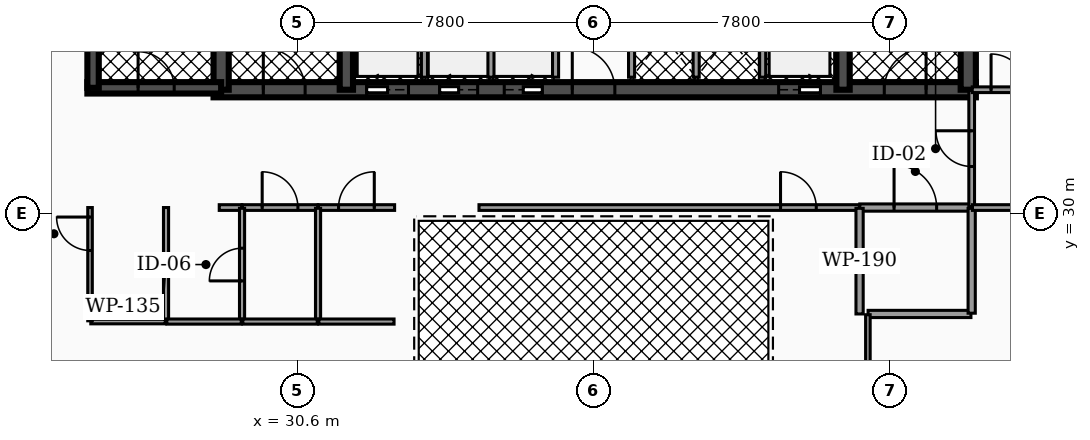
"""IFC4 building model, lengths in metres.
Left out: names, types, materials, properties, quantities, classifications, styles, units other than length and angle.
Written with IfcOpenShell. Run it as: python <this file> out.ifc"""

import sys

from ifc_helpers import new_model, si_unit, direction, frame, frame_2d, origin, place, context, subcontext, project, spatial, rectangle, extrude, element, fill, save


model = new_model("IFC4")
c1 = context("Model", 3, precision=1e-05, world=origin(), true_north=direction((0.0, 1.0)))
c2 = subcontext(c1, "Body", "Model", "MODEL_VIEW")
j1 = project(units=[si_unit("LENGTHUNIT", "METRE"), si_unit("PLANEANGLEUNIT", "RADIAN")], contexts=[c1])
p1 = place(None, origin())
s1 = spatial("IfcSite", under=j1, at=p1, CompositionType="ELEMENT")
p2 = place(p1, origin())
s2 = spatial("IfcBuilding", under=s1, at=p2, CompositionType="ELEMENT")
p3 = place(p2, frame((0.0, 0.0, 153.34)))
s3 = spatial("IfcBuildingStorey", under=s2, at=p3, CompositionType="ELEMENT", Elevation=153.34)
p4 = place(p3, frame((28.4, 33.25, 0.0), z_axis=(0.0, 0.0, 1.0), x_axis=(1.0, 0.0, 0.0)))
e1 = element("IfcWall", 1, at=p4, inside=s3, PredefinedType="SHEAR", context=c2, shape_type="SweptSolid", body=[
    extrude(rectangle(XDim=20.06, YDim=0.4, at=frame_2d((10.03, 0.0))), origin(), (0.0, 0.0, 1.0), 3.5),
])
p5 = place(p4, frame((4.03, 0.0, 0.0)))
e2 = element("IfcOpeningElement", 2, at=p5, cuts=e1, PredefinedType="OPENING", context=c2, shape_type="SweptSolid", body=[
    extrude(rectangle(XDim=1.1, YDim=2.15, at=frame_2d((0.55, 1.075))), frame((0.0, 0.21, 0.0), z_axis=(0.0, -1.0, 0.0), x_axis=(1.0, 0.0, 0.0)), (0.0, 0.0, 1.0), 0.42),
])
p6 = place(p4, frame((14.87, 0.0, 0.0)))
e3 = element("IfcOpeningElement", 3, at=p6, cuts=e1, PredefinedType="OPENING", context=c2, shape_type="SweptSolid", body=[
    extrude(rectangle(XDim=1.1, YDim=2.15, at=frame_2d((0.55, 1.075))), frame((0.0, 0.21, 0.0), z_axis=(0.0, -1.0, 0.0), x_axis=(1.0, 0.0, 0.0)), (0.0, 0.0, 1.0), 0.42),
])
p7 = place(p4, frame((5.95, 0.0, 0.0)))
e4 = element("IfcOpeningElement", 4, at=p7, cuts=e1, PredefinedType="OPENING", context=c2, shape_type="SweptSolid", body=[
    extrude(rectangle(XDim=1.0, YDim=2.1, at=frame_2d((0.5, 1.05))), frame((0.0, 0.21, 0.0), z_axis=(0.0, -1.0, 0.0), x_axis=(1.0, 0.0, 0.0)), (0.0, 0.0, 1.0), 0.42),
])
p8 = place(p4, frame((7.65, 0.0, 0.0)))
e5 = element("IfcOpeningElement", 5, at=p8, cuts=e1, PredefinedType="OPENING", context=c2, shape_type="SweptSolid", body=[
    extrude(rectangle(XDim=1.0, YDim=2.1, at=frame_2d((0.5, 1.05))), frame((0.0, 0.21, 0.0), z_axis=(0.0, -1.0, 0.0), x_axis=(1.0, 0.0, 0.0)), (0.0, 0.0, 1.0), 0.42),
])
p9 = place(p4, frame((1.31, 0.0, 0.0)))
e6 = element("IfcOpeningElement", 6, at=p9, cuts=e1, PredefinedType="OPENING", context=c2, shape_type="SweptSolid", body=[
    extrude(rectangle(XDim=1.1, YDim=2.2, at=frame_2d((0.55, 1.1))), frame((0.0, 0.21, 0.0), z_axis=(0.0, -1.0, 0.0), x_axis=(1.0, 0.0, 0.0)), (0.0, 0.0, 1.0), 0.42),
])
p10 = place(p4, frame((9.44, 0.0, 0.0)))
e7 = element("IfcOpeningElement", 7, at=p10, cuts=e1, PredefinedType="OPENING", context=c2, shape_type="SweptSolid", body=[
    extrude(rectangle(XDim=1.12, YDim=2.05, at=frame_2d((0.56, 1.025))), frame((0.0, 0.21, 0.0), z_axis=(0.0, -1.0, 0.0), x_axis=(1.0, 0.0, 0.0)), (0.0, 0.0, 1.0), 0.42),
])
p11 = place(p4, frame((17.65, 0.0, 0.0)))
e8 = element("IfcOpeningElement", 8, at=p11, cuts=e1, PredefinedType="OPENING", context=c2, shape_type="SweptSolid", body=[
    extrude(rectangle(XDim=1.1, YDim=2.2, at=frame_2d((0.55, 1.1))), frame((0.0, 0.21, 0.0), z_axis=(0.0, -1.0, 0.0), x_axis=(1.0, 0.0, 0.0)), (0.0, 0.0, 1.0), 0.42),
])
p12 = place(p3, frame((28.6, 33.25, 0.0), z_axis=(0.0, 0.0, 1.0), x_axis=(0.0, 1.0, 0.0)))
e9 = element("IfcWall", 9, at=p12, inside=s3, PredefinedType="SHEAR", context=c2, shape_type="SweptSolid", body=[
    extrude(rectangle(XDim=10.2, YDim=0.4, at=frame_2d((5.1, 0.0))), origin(), (0.0, 0.0, 1.0), 3.5),
])
for number, where, z_axis, x_axis in (
    (10, (31.895, 33.25, 0.0), (0.0, 0.0, 1.0), (0.0, 1.0, 0.0)),
    (11, (44.965, 33.25, 0.0), (0.0, 0.0, 1.0), (0.0, 1.0, 0.0)),
):
    element("IfcWall", number, at=place(p3, frame(where, z_axis=z_axis, x_axis=x_axis)), inside=s3, PredefinedType="SHEAR", context=c2, shape_type="SweptSolid", body=[
        extrude(rectangle(XDim=10.2, YDim=0.35, at=frame_2d((5.1, 0.0))), origin(), (0.0, 0.0, 1.0), 3.5),
    ])
p13 = place(p3, frame((48.26, 33.25, 0.0), z_axis=(0.0, 0.0, 1.0), x_axis=(0.0, 1.0, 0.0)))
e12 = element("IfcWall", 12, at=p13, inside=s3, PredefinedType="SHEAR", context=c2, shape_type="SweptSolid", body=[
    extrude(rectangle(XDim=10.2, YDim=0.4, at=frame_2d((5.1, 0.0))), origin(), (0.0, 0.0, 1.0), 3.5),
])
p14 = place(p3, frame((25.08, 33.3, 0.0), z_axis=(0.0, 0.0, 1.0), x_axis=(1.0, 0.0, 0.0)))
e13 = element("IfcWall", 13, at=p14, inside=s3, PredefinedType="SHEAR", context=c2, shape_type="SweptSolid", body=[
    extrude(rectangle(XDim=3.52, YDim=0.3, at=frame_2d((1.76, 0.0))), origin(), (0.0, 0.0, 1.0), 3.5),
])
p15 = place(p14, frame((1.335, 0.0, 0.0)))
e14 = element("IfcOpeningElement", 14, at=p15, cuts=e13, PredefinedType="OPENING", context=c2, shape_type="SweptSolid", body=[
    extrude(rectangle(XDim=0.95, YDim=2.2, at=frame_2d((0.475, 1.1))), frame((0.0, 0.16, 0.0), z_axis=(0.0, -1.0, 0.0), x_axis=(1.0, 0.0, 0.0)), (0.0, 0.0, 1.0), 0.32),
])
p16 = place(p3, frame((25.23, 33.3, 0.0), z_axis=(0.0, 0.0, 1.0), x_axis=(0.0, 1.0, 0.0)))
e15 = element("IfcWall", 15, at=p16, inside=s3, PredefinedType="SHEAR", context=c2, shape_type="SweptSolid", body=[
    extrude(rectangle(XDim=7.6, YDim=0.3, at=frame_2d((3.8, 0.0))), origin(), (0.0, 0.0, 1.0), 3.5),
])
for number, where, z_axis, x_axis in (
    (16, (33.95, 33.58, 0.0), (0.0, 0.0, 1.0), (0.0, 1.0, 0.0)),
    (17, (42.85, 33.58, 0.0), (0.0, 0.0, 1.0), (0.0, 1.0, 0.0)),
):
    element("IfcWall", number, at=place(p3, frame(where, z_axis=z_axis, x_axis=x_axis)), inside=s3, PredefinedType="SOLIDWALL", context=c2, shape_type="SweptSolid", body=[
        extrude(rectangle(XDim=2.45, YDim=0.16, at=frame_2d((1.225, 0.0))), origin(), (0.0, 0.0, 1.0), 2.472),
    ])
for number, where, z_axis, x_axis in (
    (18, (35.7, 33.58, 0.0), (0.0, 0.0, 1.0), (0.0, 1.0, 0.0)),
    (19, (37.4, 33.58, 0.0), (0.0, 0.0, 1.0), (0.0, 1.0, 0.0)),
    (20, (39.4, 33.58, 0.0), (0.0, 0.0, 1.0), (0.0, 1.0, 0.0)),
    (21, (41.1, 33.58, 0.0), (0.0, 0.0, 1.0), (0.0, 1.0, 0.0)),
):
    element("IfcWall", number, at=place(p3, frame(where, z_axis=z_axis, x_axis=x_axis)), inside=s3, PredefinedType="SOLIDWALL", context=c2, shape_type="SweptSolid", body=[
        extrude(rectangle(XDim=2.25, YDim=0.16, at=frame_2d((1.125, 0.0))), origin(), (0.0, 0.0, 1.0), 2.472),
    ])
p17 = place(p3, frame((45.405, 30.15, 0.0), z_axis=(0.0, 0.0, 1.0), x_axis=(1.0, 0.0, 0.0)))
e22 = element("IfcWall", 22, at=p17, inside=s3, PredefinedType="PARTITIONING", context=c2, shape_type="SweptSolid", body=[
    extrude(rectangle(XDim=2.925, YDim=0.19, at=frame_2d((1.462, 0.0))), origin(), (0.0, 0.0, 1.0), 2.447),
])
p18 = place(p17, frame((0.903, 0.0, 0.0)))
e23 = element("IfcOpeningElement", 23, at=p18, cuts=e22, PredefinedType="OPENING", context=c2, shape_type="SweptSolid", body=[
    extrude(rectangle(XDim=1.12, YDim=2.05, at=frame_2d((0.56, 1.025))), frame((0.0, 0.105, 0.0), z_axis=(0.0, -1.0, 0.0), x_axis=(1.0, 0.0, 0.0)), (0.0, 0.0, 1.0), 0.21),
])
p19 = place(p3, frame((48.35, 30.17, 0.0), z_axis=(0.0, 0.0, 1.0), x_axis=(0.0, 1.0, 0.0)))
e24 = element("IfcWall", 24, at=p19, inside=s3, PredefinedType="PARTITIONING", context=c2, shape_type="SweptSolid", body=[
    extrude(rectangle(XDim=3.06, YDim=0.15, at=frame_2d((1.53, 0.0))), origin(), (0.0, 0.0, 1.0), 2.447),
])
p20 = place(p19, frame((1.06, 0.0, 0.0)))
e25 = element("IfcOpeningElement", 25, at=p20, cuts=e24, PredefinedType="OPENING", context=c2, shape_type="SweptSolid", body=[
    extrude(rectangle(XDim=0.94, YDim=2.05, at=frame_2d((0.47, 1.025))), frame((0.0, 0.085, 0.0), z_axis=(0.0, -1.0, 0.0), x_axis=(1.0, 0.0, 0.0)), (0.0, 0.0, 1.0), 0.17),
])
p21 = place(p3, frame((28.55, 30.15, 0.0), z_axis=(0.0, 0.0, 1.0), x_axis=(1.0, 0.0, 0.0)))
e26 = element("IfcWall", 26, at=p21, inside=s3, PredefinedType="PARTITIONING", context=c2, shape_type="SweptSolid", body=[
    extrude(rectangle(XDim=0.595, YDim=0.15, at=frame_2d((0.297, 0.0))), origin(), (0.0, 0.0, 1.0), 2.447),
])
p22 = place(p3, frame((29.155, 30.15, 0.0), z_axis=(0.0, 0.0, 1.0), x_axis=(1.0, 0.0, 0.0)))
e27 = element("IfcWall", 27, at=p22, inside=s3, PredefinedType="PARTITIONING", context=c2, shape_type="SweptSolid", body=[
    extrude(rectangle(XDim=1.99, YDim=0.15, at=frame_2d((0.995, 0.0))), origin(), (0.0, 0.0, 1.0), 2.447),
])
p23 = place(p22, frame((0.525, 0.0, 0.0)))
e28 = element("IfcOpeningElement", 28, at=p23, cuts=e27, PredefinedType="OPENING", context=c2, shape_type="SweptSolid", body=[
    extrude(rectangle(XDim=0.94, YDim=2.05, at=frame_2d((0.47, 1.025))), frame((0.0, 0.085, 0.0), z_axis=(0.0, -1.0, 0.0), x_axis=(1.0, 0.0, 0.0)), (0.0, 0.0, 1.0), 0.17),
])
p24 = place(p3, frame((31.155, 30.15, 0.0), z_axis=(0.0, 0.0, 1.0), x_axis=(1.0, 0.0, 0.0)))
e29 = element("IfcWall", 29, at=p24, inside=s3, PredefinedType="PARTITIONING", context=c2, shape_type="SweptSolid", body=[
    extrude(rectangle(XDim=2.01, YDim=0.15, at=frame_2d((1.005, 0.0))), origin(), (0.0, 0.0, 1.0), 2.447),
])
p25 = place(p24, frame((0.535, 0.0, 0.0)))
e30 = element("IfcOpeningElement", 30, at=p25, cuts=e29, PredefinedType="OPENING", context=c2, shape_type="SweptSolid", body=[
    extrude(rectangle(XDim=0.94, YDim=2.05, at=frame_2d((0.47, 1.025))), frame((0.0, 0.085, 0.0), z_axis=(0.0, -1.0, 0.0), x_axis=(1.0, 0.0, 0.0)), (0.0, 0.0, 1.0), 0.17),
])
p26 = place(p3, frame((35.385, 30.15, 0.0), z_axis=(0.0, 0.0, 1.0), x_axis=(1.0, 0.0, 0.0)))
e31 = element("IfcWall", 31, at=p26, inside=s3, PredefinedType="PARTITIONING", context=c2, shape_type="SweptSolid", body=[
    extrude(rectangle(XDim=10.01, YDim=0.15, at=frame_2d((5.005, 0.0))), origin(), (0.0, 0.0, 1.0), 2.447),
])
p27 = place(p26, frame((7.935, 0.0, 0.0)))
e32 = element("IfcOpeningElement", 32, at=p27, cuts=e31, PredefinedType="OPENING", context=c2, shape_type="SweptSolid", body=[
    extrude(rectangle(XDim=0.94, YDim=2.05, at=frame_2d((0.47, 1.025))), frame((0.0, 0.085, 0.0), z_axis=(0.0, -1.0, 0.0), x_axis=(1.0, 0.0, 0.0)), (0.0, 0.0, 1.0), 0.17),
])
p28 = place(p3, frame((45.4, 27.35, 0.0), z_axis=(0.0, 0.0, 1.0), x_axis=(0.0, 1.0, 0.0)))
e33 = element("IfcWall", 33, at=p28, inside=s3, PredefinedType="PARTITIONING", context=c2, shape_type="SweptSolid", body=[
    extrude(rectangle(XDim=2.78, YDim=0.19, at=frame_2d((1.39, 0.0))), origin(), (0.0, 0.0, 1.0), 2.447),
])
p29 = place(p3, frame((45.624, 27.35, 0.0), z_axis=(0.0, 0.0, 1.0), x_axis=(1.0, 0.0, 0.0)))
e34 = element("IfcWall", 34, at=p29, inside=s3, PredefinedType="PARTITIONING", context=c2, shape_type="SweptSolid", body=[
    extrude(rectangle(XDim=2.706, YDim=0.19, at=frame_2d((1.353, 0.0))), origin(), (0.0, 0.0, 1.0), 2.447),
])
p30 = place(p3, frame((48.35, 27.37, 0.0), z_axis=(0.0, 0.0, 1.0), x_axis=(0.0, 1.0, 0.0)))
e35 = element("IfcWall", 35, at=p30, inside=s3, PredefinedType="PARTITIONING", context=c2, shape_type="SweptSolid", body=[
    extrude(rectangle(XDim=2.76, YDim=0.19, at=frame_2d((1.38, 0.0))), origin(), (0.0, 0.0, 1.0), 2.447),
])
p31 = place(p3, frame((48.37, 30.15, 0.0), z_axis=(0.0, 0.0, 1.0), x_axis=(1.0, 0.0, 0.0)))
e36 = element("IfcWall", 36, at=p31, inside=s3, PredefinedType="PARTITIONING", context=c2, shape_type="SweptSolid", body=[
    extrude(rectangle(XDim=3.26, YDim=0.15, at=frame_2d((1.63, 0.0))), origin(), (0.0, 0.0, 1.0), 2.447),
])
p32 = place(p31, frame((1.16, 0.0, 0.0)))
e37 = element("IfcOpeningElement", 37, at=p32, cuts=e36, PredefinedType="OPENING", context=c2, shape_type="SweptSolid", body=[
    extrude(rectangle(XDim=0.94, YDim=2.05, at=frame_2d((0.47, 1.025))), frame((0.0, 0.085, 0.0), z_axis=(0.0, -1.0, 0.0), x_axis=(1.0, 0.0, 0.0)), (0.0, 0.0, 1.0), 0.17),
])
p33 = place(p3, frame((48.365, 33.25, 0.0), z_axis=(0.0, 0.0, 1.0), x_axis=(1.0, 0.0, 0.0)))
e38 = element("IfcWall", 38, at=p33, inside=s3, PredefinedType="PARTITIONING", context=c2, shape_type="SweptSolid", body=[
    extrude(rectangle(XDim=1.93, YDim=0.15, at=frame_2d((0.965, 0.0))), origin(), (0.0, 0.0, 1.0), 2.447),
])
p34 = place(p33, frame((0.495, 0.0, 0.0)))
e39 = element("IfcOpeningElement", 39, at=p34, cuts=e38, PredefinedType="OPENING", context=c2, shape_type="SweptSolid", body=[
    extrude(rectangle(XDim=0.94, YDim=2.05, at=frame_2d((0.47, 1.025))), frame((0.0, 0.085, 0.0), z_axis=(0.0, -1.0, 0.0), x_axis=(1.0, 0.0, 0.0)), (0.0, 0.0, 1.0), 0.17),
])
p35 = place(p3, frame((27.15, 27.17, 0.0), z_axis=(0.0, 0.0, 1.0), x_axis=(0.0, 1.0, 0.0)))
e40 = element("IfcWall", 40, at=p35, inside=s3, PredefinedType="PARTITIONING", context=c2, shape_type="SweptSolid", body=[
    extrude(rectangle(XDim=2.98, YDim=0.135, at=frame_2d((1.49, 0.0))), origin(), (0.0, 0.0, 1.0), 2.447),
])
p36 = place(p3, frame((25.17, 27.15, 0.0), z_axis=(0.0, 0.0, 1.0), x_axis=(1.0, 0.0, 0.0)))
e41 = element("IfcWall", 41, at=p36, inside=s3, PredefinedType="PARTITIONING", context=c2, shape_type="SweptSolid", body=[
    extrude(rectangle(XDim=1.96, YDim=0.12, at=frame_2d((0.98, 0.0))), origin(), (0.0, 0.0, 1.0), 2.447),
])
p37 = place(p3, frame((25.15, 27.17, 0.0), z_axis=(0.0, 0.0, 1.0), x_axis=(0.0, 1.0, 0.0)))
e42 = element("IfcWall", 42, at=p37, inside=s3, PredefinedType="PARTITIONING", context=c2, shape_type="SweptSolid", body=[
    extrude(rectangle(XDim=2.98, YDim=0.12, at=frame_2d((1.49, 0.0))), origin(), (0.0, 0.0, 1.0), 2.447),
])
p38 = place(p37, frame((1.85, 0.0, 0.0)))
e43 = element("IfcOpeningElement", 43, at=p38, cuts=e42, PredefinedType="OPENING", context=c2, shape_type="SweptSolid", body=[
    extrude(rectangle(XDim=0.88, YDim=2.05, at=frame_2d((0.44, 1.025))), frame((0.0, 0.07, 0.0), z_axis=(0.0, -1.0, 0.0), x_axis=(1.0, 0.0, 0.0)), (0.0, 0.0, 1.0), 0.14),
])
p39 = place(p3, frame((29.15, 27.17, 0.0), z_axis=(0.0, 0.0, 1.0), x_axis=(0.0, 1.0, 0.0)))
e44 = element("IfcWall", 44, at=p39, inside=s3, PredefinedType="PARTITIONING", context=c2, shape_type="SweptSolid", body=[
    extrude(rectangle(XDim=2.96, YDim=0.135, at=frame_2d((1.48, 0.0))), origin(), (0.0, 0.0, 1.0), 2.447),
])
p40 = place(p39, frame((1.05, 0.0, 0.0)))
e45 = element("IfcOpeningElement", 45, at=p40, cuts=e44, PredefinedType="OPENING", context=c2, shape_type="SweptSolid", body=[
    extrude(rectangle(XDim=0.86, YDim=2.05, at=frame_2d((0.43, 1.025))), frame((0.0, 0.077, 0.0), z_axis=(0.0, -1.0, 0.0), x_axis=(1.0, 0.0, 0.0)), (0.0, 0.0, 1.0), 0.155),
])
p41 = place(p3, frame((27.17, 27.15, 0.0), z_axis=(0.0, 0.0, 1.0), x_axis=(1.0, 0.0, 0.0)))
e46 = element("IfcWall", 46, at=p41, inside=s3, PredefinedType="PARTITIONING", context=c2, shape_type="SweptSolid", body=[
    extrude(rectangle(XDim=1.96, YDim=0.135, at=frame_2d((0.98, 0.0))), origin(), (0.0, 0.0, 1.0), 2.447),
])
p42 = place(p3, frame((31.15, 27.17, 0.0), z_axis=(0.0, 0.0, 1.0), x_axis=(0.0, 1.0, 0.0)))
e47 = element("IfcWall", 47, at=p42, inside=s3, PredefinedType="PARTITIONING", context=c2, shape_type="SweptSolid", body=[
    extrude(rectangle(XDim=2.96, YDim=0.135, at=frame_2d((1.48, 0.0))), origin(), (0.0, 0.0, 1.0), 2.447),
])
p43 = place(p3, frame((29.17, 27.15, 0.0), z_axis=(0.0, 0.0, 1.0), x_axis=(1.0, 0.0, 0.0)))
e48 = element("IfcWall", 48, at=p43, inside=s3, PredefinedType="PARTITIONING", context=c2, shape_type="SweptSolid", body=[
    extrude(rectangle(XDim=1.96, YDim=0.135, at=frame_2d((0.98, 0.0))), origin(), (0.0, 0.0, 1.0), 2.447),
])
p44 = place(p3, frame((31.17, 27.15, 0.0), z_axis=(0.0, 0.0, 1.0), x_axis=(1.0, 0.0, 0.0)))
e49 = element("IfcWall", 49, at=p44, inside=s3, PredefinedType="PARTITIONING", context=c2, shape_type="SweptSolid", body=[
    extrude(rectangle(XDim=1.98, YDim=0.135, at=frame_2d((0.99, 0.0))), origin(), (0.0, 0.0, 1.0), 2.447),
])
p45 = place(p3, frame((45.619, 17.846, 0.0), z_axis=(0.0, 0.0, 1.0), x_axis=(0.0, 1.0, 0.0)))
e50 = element("IfcWall", 50, at=p45, inside=s3, PredefinedType="PARTITIONING", context=c2, shape_type="SweptSolid", body=[
    extrude(rectangle(XDim=9.484, YDim=0.12, at=frame_2d((4.742, 0.0))), origin(), (0.0, 0.0, 1.0), 2.447),
])
p46 = place(p5, origin())
e51 = element("IfcDoor", 51, at=p46, inside=s3, OperationType="SLIDING_TO_LEFT", PredefinedType="DOOR", context=c2, shape_type="SweptSolid", body=[
    extrude(rectangle(XDim=1.1, YDim=2.15, at=frame_2d((0.55, 1.075))), frame((0.0, 0.025, 0.0), z_axis=(0.0, -1.0, 0.0), x_axis=(1.0, 0.0, 0.0)), (0.0, 0.0, 1.0), 0.05),
])
fill(e2, e51)
p47 = place(p6, origin())
e52 = element("IfcDoor", 52, at=p47, inside=s3, OperationType="SLIDING_TO_RIGHT", PredefinedType="DOOR", context=c2, shape_type="SweptSolid", body=[
    extrude(rectangle(XDim=1.1, YDim=2.15, at=frame_2d((0.55, 1.075))), frame((0.0, 0.025, 0.0), z_axis=(0.0, -1.0, 0.0), x_axis=(1.0, 0.0, 0.0)), (0.0, 0.0, 1.0), 0.05),
])
fill(e3, e52)
p48 = place(p7, origin())
e53 = element("IfcDoor", 53, at=p48, inside=s3, OperationType="SLIDING_TO_LEFT", PredefinedType="DOOR", context=c2, shape_type="SweptSolid", body=[
    extrude(rectangle(XDim=1.0, YDim=2.1, at=frame_2d((0.5, 1.05))), frame((0.0, 0.025, 0.0), z_axis=(0.0, -1.0, 0.0), x_axis=(1.0, 0.0, 0.0)), (0.0, 0.0, 1.0), 0.05),
])
fill(e4, e53)
p49 = place(p8, origin())
e54 = element("IfcDoor", 54, at=p49, inside=s3, OperationType="SLIDING_TO_RIGHT", PredefinedType="DOOR", context=c2, shape_type="SweptSolid", body=[
    extrude(rectangle(XDim=1.0, YDim=2.1, at=frame_2d((0.5, 1.05))), frame((0.0, 0.025, 0.0), z_axis=(0.0, -1.0, 0.0), x_axis=(1.0, 0.0, 0.0)), (0.0, 0.0, 1.0), 0.05),
])
fill(e5, e54)
p50 = place(p9, origin())
e55 = element("IfcDoor", 55, at=p50, inside=s3, OperationType="SINGLE_SWING_LEFT", PredefinedType="DOOR", context=c2, shape_type="SweptSolid", body=[
    extrude(rectangle(XDim=1.1, YDim=2.2, at=frame_2d((0.55, 1.1))), frame((0.0, 0.025, 0.0), z_axis=(0.0, -1.0, 0.0), x_axis=(1.0, 0.0, 0.0)), (0.0, 0.0, 1.0), 0.05),
])
fill(e6, e55)
p51 = place(p10, origin())
e56 = element("IfcDoor", 56, at=p51, inside=s3, OperationType="SINGLE_SWING_LEFT", PredefinedType="DOOR", context=c2, shape_type="SweptSolid", body=[
    extrude(rectangle(XDim=1.12, YDim=2.05, at=frame_2d((0.56, 1.025))), frame((0.0, 0.025, 0.0), z_axis=(0.0, -1.0, 0.0), x_axis=(1.0, 0.0, 0.0)), (0.0, 0.0, 1.0), 0.05),
])
fill(e7, e56)
p52 = place(p11, origin())
e57 = element("IfcDoor", 57, at=p52, inside=s3, OperationType="SINGLE_SWING_RIGHT", PredefinedType="DOOR", context=c2, shape_type="SweptSolid", body=[
    extrude(rectangle(XDim=1.1, YDim=2.2, at=frame_2d((0.55, 1.1))), frame((0.0, 0.025, 0.0), z_axis=(0.0, -1.0, 0.0), x_axis=(1.0, 0.0, 0.0)), (0.0, 0.0, 1.0), 0.05),
])
fill(e8, e57)
p53 = place(p15, origin())
e58 = element("IfcDoor", 58, at=p53, inside=s3, OperationType="SINGLE_SWING_LEFT", PredefinedType="DOOR", context=c2, shape_type="SweptSolid", body=[
    extrude(rectangle(XDim=0.95, YDim=2.2, at=frame_2d((0.475, 1.1))), frame((0.0, 0.025, 0.0), z_axis=(0.0, -1.0, 0.0), x_axis=(1.0, 0.0, 0.0)), (0.0, 0.0, 1.0), 0.05),
])
fill(e14, e58)
p54 = place(p18, origin())
e59 = element("IfcDoor", 59, at=p54, inside=s3, OperationType="SINGLE_SWING_LEFT", PredefinedType="DOOR", context=c2, shape_type="SweptSolid", body=[
    extrude(rectangle(XDim=1.12, YDim=2.05, at=frame_2d((0.56, 1.025))), frame((0.0, 0.025, 0.0), z_axis=(0.0, -1.0, 0.0), x_axis=(1.0, 0.0, 0.0)), (0.0, 0.0, 1.0), 0.05),
])
fill(e23, e59)
p55 = place(p20, origin())
e60 = element("IfcDoor", 60, at=p55, inside=s3, OperationType="SINGLE_SWING_RIGHT", PredefinedType="DOOR", context=c2, shape_type="SweptSolid", body=[
    extrude(rectangle(XDim=0.94, YDim=2.05, at=frame_2d((0.47, 1.025))), frame((0.0, 0.025, 0.0), z_axis=(0.0, -1.0, 0.0), x_axis=(1.0, 0.0, 0.0)), (0.0, 0.0, 1.0), 0.05),
])
fill(e25, e60)
p56 = place(p23, origin())
e61 = element("IfcDoor", 61, at=p56, inside=s3, OperationType="SINGLE_SWING_LEFT", PredefinedType="DOOR", context=c2, shape_type="SweptSolid", body=[
    extrude(rectangle(XDim=0.94, YDim=2.05, at=frame_2d((0.47, 1.025))), frame((0.0, 0.025, 0.0), z_axis=(0.0, -1.0, 0.0), x_axis=(1.0, 0.0, 0.0)), (0.0, 0.0, 1.0), 0.05),
])
fill(e28, e61)
p57 = place(p25, origin())
e62 = element("IfcDoor", 62, at=p57, inside=s3, OperationType="SINGLE_SWING_RIGHT", PredefinedType="DOOR", context=c2, shape_type="SweptSolid", body=[
    extrude(rectangle(XDim=0.94, YDim=2.05, at=frame_2d((0.47, 1.025))), frame((0.0, 0.025, 0.0), z_axis=(0.0, -1.0, 0.0), x_axis=(1.0, 0.0, 0.0)), (0.0, 0.0, 1.0), 0.05),
])
fill(e30, e62)
p58 = place(p27, origin())
e63 = element("IfcDoor", 63, at=p58, inside=s3, OperationType="SINGLE_SWING_LEFT", PredefinedType="DOOR", context=c2, shape_type="SweptSolid", body=[
    extrude(rectangle(XDim=0.94, YDim=2.05, at=frame_2d((0.47, 1.025))), frame((0.0, 0.025, 0.0), z_axis=(0.0, -1.0, 0.0), x_axis=(1.0, 0.0, 0.0)), (0.0, 0.0, 1.0), 0.05),
])
fill(e32, e63)
p59 = place(p34, origin())
e64 = element("IfcDoor", 64, at=p59, inside=s3, OperationType="SINGLE_SWING_LEFT", PredefinedType="DOOR", context=c2, shape_type="SweptSolid", body=[
    extrude(rectangle(XDim=0.94, YDim=2.05, at=frame_2d((0.47, 1.025))), frame((0.0, 0.025, 0.0), z_axis=(0.0, -1.0, 0.0), x_axis=(1.0, 0.0, 0.0)), (0.0, 0.0, 1.0), 0.05),
])
fill(e39, e64)
p60 = place(p38, origin())
e65 = element("IfcDoor", 65, at=p60, inside=s3, OperationType="SINGLE_SWING_RIGHT", PredefinedType="DOOR", context=c2, shape_type="SweptSolid", body=[
    extrude(rectangle(XDim=0.88, YDim=2.05, at=frame_2d((0.44, 1.025))), frame((0.0, 0.025, 0.0), z_axis=(0.0, -1.0, 0.0), x_axis=(1.0, 0.0, 0.0)), (0.0, 0.0, 1.0), 0.05),
])
fill(e43, e65)
p61 = place(p40, origin())
e66 = element("IfcDoor", 66, at=p61, inside=s3, OperationType="SINGLE_SWING_LEFT", PredefinedType="DOOR", context=c2, shape_type="SweptSolid", body=[
    extrude(rectangle(XDim=0.86, YDim=2.05, at=frame_2d((0.43, 1.025))), frame((0.0, 0.025, 0.0), z_axis=(0.0, -1.0, 0.0), x_axis=(1.0, 0.0, 0.0)), (0.0, 0.0, 1.0), 0.05),
])
fill(e45, e66)
save(model, sys.argv[1])
